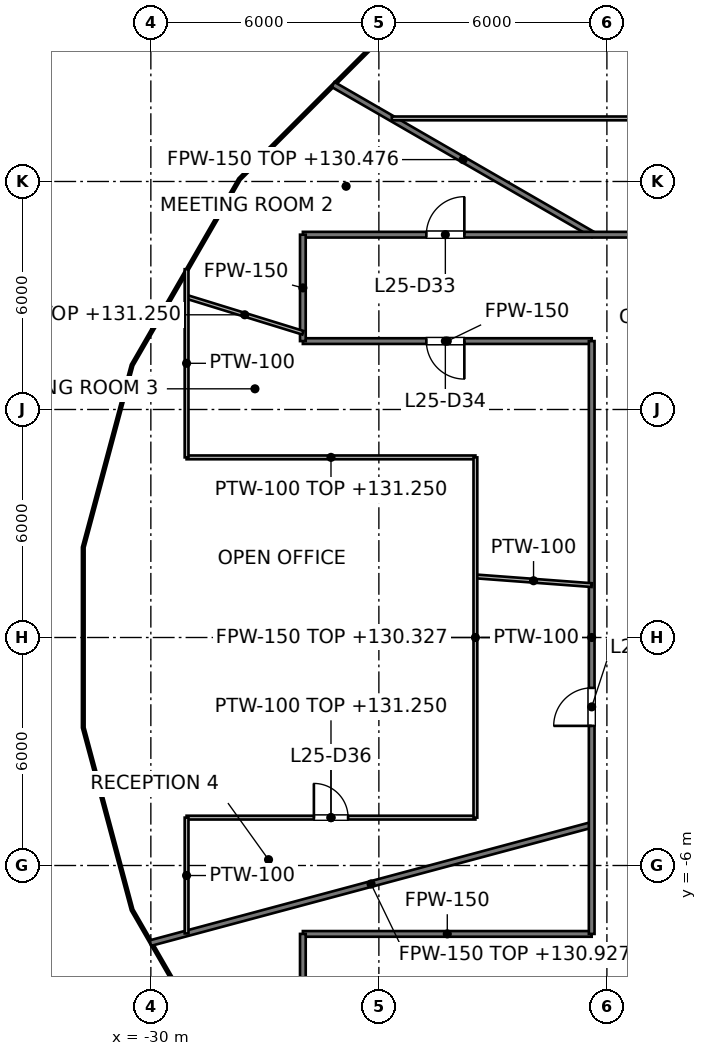
"""IFC4 building model, lengths in metres.
Left out: names, types, materials, properties, quantities, classifications, styles, units other than length and angle.
Written with IfcOpenShell. Run it as: python <this file> out.ifc"""

import sys

from ifc_helpers import new_model, si_unit, direction, frame, frame_2d, origin, place, context, subcontext, project, spatial, rectangle, extrude, element, fill, save


model = new_model("IFC4")
c1 = context("Model", 3, precision=1e-05, world=origin(), true_north=direction((0.0, 1.0)))
c2 = subcontext(c1, "Body", "Model", "MODEL_VIEW")
j1 = project(units=[si_unit("LENGTHUNIT", "METRE"), si_unit("PLANEANGLEUNIT", "RADIAN")], contexts=[c1])
p1 = place(None, origin())
s1 = spatial("IfcSite", under=j1, at=p1, CompositionType="ELEMENT")
p2 = place(p1, origin())
s2 = spatial("IfcBuilding", under=s1, at=p2, CompositionType="ELEMENT")
p3 = place(p2, frame((0.0, 0.0, 127.2)))
s3 = spatial("IfcBuildingStorey", under=s2, at=p3, CompositionType="ELEMENT", Elevation=127.2)
p4 = place(p3, frame((-25.205, 14.552, 0.0), z_axis=(0.0, 0.0, 1.0), x_axis=(0.866027670838, -0.499996073327, 0.0)))
e1 = element("IfcWall", 1, at=p4, inside=s3, PredefinedType="PARTITIONING", context=c2, shape_type="SweptSolid", body=[
    extrude(rectangle(XDim=7.904, YDim=0.15, at=frame_2d((3.952, 0.0))), origin(), (0.0, 0.0, 1.0), 3.276),
])
p5 = place(p3, frame((-26.0, -7.8, 0.0), z_axis=(0.0, 0.0, 1.0), x_axis=(1.0, 0.0, 0.0)))
e2 = element("IfcWall", 2, at=p5, inside=s3, PredefinedType="PARTITIONING", context=c2, shape_type="SweptSolid", body=[
    extrude(rectangle(XDim=7.6, YDim=0.15, at=frame_2d((3.8, 0.0))), origin(), (0.0, 0.0, 1.0), 3.195),
])
p6 = place(p3, frame((-26.0, 7.8, 0.0), z_axis=(0.0, 0.0, 1.0), x_axis=(1.0, 0.0, 0.0)))
e3 = element("IfcWall", 3, at=p6, inside=s3, PredefinedType="PARTITIONING", context=c2, shape_type="SweptSolid", body=[
    extrude(rectangle(XDim=7.6, YDim=0.15, at=frame_2d((3.8, 0.0))), origin(), (0.0, 0.0, 1.0), 3.195),
])
p7 = place(p6, frame((3.249, 0.0, 0.0)))
e4 = element("IfcOpeningElement", 4, at=p7, cuts=e3, PredefinedType="OPENING", context=c2, shape_type="SweptSolid", body=[
    extrude(rectangle(XDim=1.0, YDim=2.1, at=frame_2d((0.5, 1.05))), frame((0.0, 0.075, 0.0), z_axis=(0.0, -1.0, 0.0), x_axis=(1.0, 0.0, 0.0)), (0.0, 0.0, 1.0), 0.15),
])
p8 = place(p3, frame((-26.0, 10.6, 0.0), z_axis=(0.0, 0.0, 1.0), x_axis=(1.0, 0.0, 0.0)))
e5 = element("IfcWall", 5, at=p8, inside=s3, PredefinedType="PARTITIONING", context=c2, shape_type="SweptSolid", body=[
    extrude(rectangle(XDim=52.0, YDim=0.15, at=frame_2d((26.0, 0.0))), origin(), (0.0, 0.0, 1.0), 3.127),
])
p9 = place(p8, frame((41.861, 0.0, 0.0)))
e6 = element("IfcOpeningElement", 6, at=p9, cuts=e5, PredefinedType="OPENING", context=c2, shape_type="SweptSolid", body=[
    extrude(rectangle(XDim=1.2, YDim=2.1, at=frame_2d((0.6, 1.05))), frame((0.0, 0.075, 0.0), z_axis=(0.0, -1.0, 0.0), x_axis=(1.0, 0.0, 0.0)), (0.0, 0.0, 1.0), 0.15),
])
p10 = place(p8, frame((31.083, 0.0, 0.0)))
e7 = element("IfcOpeningElement", 7, at=p10, cuts=e5, PredefinedType="OPENING", context=c2, shape_type="SweptSolid", body=[
    extrude(rectangle(XDim=1.0, YDim=2.1, at=frame_2d((0.5, 1.05))), frame((0.0, 0.075, 0.0), z_axis=(0.0, -1.0, 0.0), x_axis=(1.0, 0.0, 0.0)), (0.0, 0.0, 1.0), 0.15),
])
p11 = place(p8, frame((29.233, 0.0, 0.0)))
e8 = element("IfcOpeningElement", 8, at=p11, cuts=e5, PredefinedType="OPENING", context=c2, shape_type="SweptSolid", body=[
    extrude(rectangle(XDim=1.0, YDim=2.1, at=frame_2d((0.5, 1.05))), frame((0.0, 0.075, 0.0), z_axis=(0.0, -1.0, 0.0), x_axis=(1.0, 0.0, 0.0)), (0.0, 0.0, 1.0), 0.15),
])
p12 = place(p8, frame((25.5, 0.0, 0.0)))
e9 = element("IfcOpeningElement", 9, at=p12, cuts=e5, PredefinedType="OPENING", context=c2, shape_type="SweptSolid", body=[
    extrude(rectangle(XDim=1.0, YDim=2.1, at=frame_2d((0.5, 1.05))), frame((0.0, 0.075, 0.0), z_axis=(0.0, -1.0, 0.0), x_axis=(1.0, 0.0, 0.0)), (0.0, 0.0, 1.0), 0.15),
])
p13 = place(p8, frame((14.83, 0.0, 0.0)))
e10 = element("IfcOpeningElement", 10, at=p13, cuts=e5, PredefinedType="OPENING", context=c2, shape_type="SweptSolid", body=[
    extrude(rectangle(XDim=1.0, YDim=2.1, at=frame_2d((0.5, 1.05))), frame((0.0, 0.075, 0.0), z_axis=(0.0, -1.0, 0.0), x_axis=(1.0, 0.0, 0.0)), (0.0, 0.0, 1.0), 0.15),
])
p14 = place(p8, frame((3.249, 0.0, 0.0)))
e11 = element("IfcOpeningElement", 11, at=p14, cuts=e5, PredefinedType="OPENING", context=c2, shape_type="SweptSolid", body=[
    extrude(rectangle(XDim=1.0, YDim=2.1, at=frame_2d((0.5, 1.05))), frame((0.0, 0.075, 0.0), z_axis=(0.0, -1.0, 0.0), x_axis=(1.0, 0.0, 0.0)), (0.0, 0.0, 1.0), 0.15),
])
p15 = place(p3, frame((-30.012, -8.042, 0.0), z_axis=(0.0, 0.0, 1.0), x_axis=(0.965928199485, 0.25881018805, 0.0)))
e12 = element("IfcWall", 12, at=p15, inside=s3, PredefinedType="PARTITIONING", context=c2, shape_type="SweptSolid", body=[
    extrude(rectangle(XDim=12.022, YDim=0.15, at=frame_2d((6.011, 0.0))), origin(), (0.0, 0.0, 1.0), 3.727),
])
p16 = place(p3, frame((-18.4, -7.8, 0.0), z_axis=(0.0, 0.0, 1.0), x_axis=(0.0, 1.0, 0.0)))
e13 = element("IfcWall", 13, at=p16, inside=s3, PredefinedType="PARTITIONING", context=c2, shape_type="SweptSolid", body=[
    extrude(rectangle(XDim=15.6, YDim=0.15, at=frame_2d((7.8, 0.0))), origin(), (0.0, 0.0, 1.0), 3.127),
])
p17 = place(p16, frame((5.474, 0.0, 0.0)))
e14 = element("IfcOpeningElement", 14, at=p17, cuts=e13, PredefinedType="OPENING", context=c2, shape_type="SweptSolid", body=[
    extrude(rectangle(XDim=1.0, YDim=2.1, at=frame_2d((0.5, 1.05))), frame((0.0, 0.075, 0.0), z_axis=(0.0, -1.0, 0.0), x_axis=(1.0, 0.0, 0.0)), (0.0, 0.0, 1.0), 0.15),
])
for number, where, z_axis, x_axis in (
    (15, (-26.0, -10.6, 0.0), (0.0, 0.0, 1.0), (0.0, 1.0, 0.0)),
    (16, (-26.0, 7.8, 0.0), (0.0, 0.0, 1.0), (0.0, 1.0, 0.0)),
):
    element("IfcWall", number, at=place(p3, frame(where, z_axis=z_axis, x_axis=x_axis)), inside=s3, PredefinedType="PARTITIONING", context=c2, shape_type="SweptSolid", body=[
        extrude(rectangle(XDim=2.8, YDim=0.15, at=frame_2d((1.4, 0.0))), origin(), (0.0, 0.0, 1.0), 3.195),
    ])
p18 = place(p3, frame((-29.06, 8.964, 0.0), z_axis=(0.0, 0.0, 1.0), x_axis=(0.955556205091, -0.294808987162, 0.0)))
e17 = element("IfcWall", 17, at=p18, inside=s3, PredefinedType="PARTITIONING", context=c2, shape_type="SweptSolid", body=[
    extrude(rectangle(XDim=3.202, YDim=0.1, at=frame_2d((1.601, 0.0))), origin(), (0.0, 0.0, 1.0), 4.05),
])
p19 = place(p3, frame((-21.46, 1.608, 0.0), z_axis=(0.0, 0.0, 1.0), x_axis=(0.997211460705, -0.074627760503, 0.0)))
e18 = element("IfcWall", 18, at=p19, inside=s3, PredefinedType="PARTITIONING", context=c2, shape_type="SweptSolid", body=[
    extrude(rectangle(XDim=3.069, YDim=0.1, at=frame_2d((1.534, 0.0))), origin(), (0.0, 0.0, 1.0), 3.127),
])
p20 = place(p3, frame((-29.06, -4.74, 0.0), z_axis=(0.0, 0.0, 1.0), x_axis=(1.0, 0.0, 0.0)))
e19 = element("IfcWall", 19, at=p20, inside=s3, PredefinedType="PARTITIONING", context=c2, shape_type="SweptSolid", body=[
    extrude(rectangle(XDim=7.6, YDim=0.1, at=frame_2d((3.8, 0.0))), origin(), (0.0, 0.0, 1.0), 4.05),
])
p21 = place(p20, frame((3.35, 0.0, 0.0)))
e20 = element("IfcOpeningElement", 20, at=p21, cuts=e19, PredefinedType="OPENING", context=c2, shape_type="SweptSolid", body=[
    extrude(rectangle(XDim=0.9, YDim=2.1, at=frame_2d((0.45, 1.05))), frame((0.0, 0.05, 0.0), z_axis=(0.0, -1.0, 0.0), x_axis=(1.0, 0.0, 0.0)), (0.0, 0.0, 1.0), 0.1),
])
p22 = place(p3, frame((-29.06, 4.74, 0.0), z_axis=(0.0, 0.0, 1.0), x_axis=(1.0, 0.0, 0.0)))
e21 = element("IfcWall", 21, at=p22, inside=s3, PredefinedType="PARTITIONING", context=c2, shape_type="SweptSolid", body=[
    extrude(rectangle(XDim=7.6, YDim=0.1, at=frame_2d((3.8, 0.0))), origin(), (0.0, 0.0, 1.0), 4.05),
])
p23 = place(p3, frame((-23.66, 13.66, 0.0), z_axis=(0.0, 0.0, 1.0), x_axis=(1.0, 0.0, 0.0)))
e22 = element("IfcWall", 22, at=p23, inside=s3, PredefinedType="PARTITIONING", context=c2, shape_type="SweptSolid", body=[
    extrude(rectangle(XDim=32.451, YDim=0.1, at=frame_2d((16.226, 0.0))), origin(), (0.0, 0.0, 1.0), 3.127),
])
p24 = place(p23, frame((9.55, 0.0, 0.0)))
e23 = element("IfcOpeningElement", 23, at=p24, cuts=e22, PredefinedType="OPENING", context=c2, shape_type="SweptSolid", body=[
    extrude(rectangle(XDim=0.9, YDim=2.1, at=frame_2d((0.45, 1.05))), frame((0.0, 0.05, 0.0), z_axis=(0.0, -1.0, 0.0), x_axis=(1.0, 0.0, 0.0)), (0.0, 0.0, 1.0), 0.1),
])
p25 = place(p3, frame((-21.46, -4.74, 0.0), z_axis=(0.0, 0.0, 1.0), x_axis=(0.0, 1.0, 0.0)))
e24 = element("IfcWall", 24, at=p25, inside=s3, PredefinedType="PARTITIONING", context=c2, shape_type="SweptSolid", body=[
    extrude(rectangle(XDim=9.48, YDim=0.1, at=frame_2d((4.74, 0.0))), origin(), (0.0, 0.0, 1.0), 3.127),
])
p26 = place(p3, frame((-29.06, -7.787, 0.0), z_axis=(0.0, 0.0, 1.0), x_axis=(0.0, 1.0, 0.0)))
e25 = element("IfcWall", 25, at=p26, inside=s3, PredefinedType="PARTITIONING", context=c2, shape_type="SweptSolid", body=[
    extrude(rectangle(XDim=3.047, YDim=0.1, at=frame_2d((1.523, 0.0))), origin(), (0.0, 0.0, 1.0), 3.127),
])
p27 = place(p3, frame((-29.06, 4.74, 0.0), z_axis=(0.0, 0.0, 1.0), x_axis=(0.0, 1.0, 0.0)))
e26 = element("IfcWall", 26, at=p27, inside=s3, PredefinedType="PARTITIONING", context=c2, shape_type="SweptSolid", body=[
    extrude(rectangle(XDim=4.951, YDim=0.1, at=frame_2d((2.476, 0.0))), origin(), (0.0, 0.0, 1.0), 3.127),
])
p28 = place(p14, origin())
e27 = element("IfcDoor", 27, at=p28, inside=s3, OperationType="SINGLE_SWING_RIGHT", PredefinedType="DOOR", context=c2, shape_type="SweptSolid", body=[
    extrude(rectangle(XDim=1.0, YDim=2.1, at=frame_2d((0.5, 1.05))), frame((0.0, 0.025, 0.0), z_axis=(0.0, -1.0, 0.0), x_axis=(1.0, 0.0, 0.0)), (0.0, 0.0, 1.0), 0.05),
])
fill(e11, e27)
p29 = place(p7, origin())
e28 = element("IfcDoor", 28, at=p29, inside=s3, OperationType="SINGLE_SWING_RIGHT", PredefinedType="DOOR", context=c2, shape_type="SweptSolid", body=[
    extrude(rectangle(XDim=1.0, YDim=2.1, at=frame_2d((0.5, 1.05))), frame((0.0, 0.025, 0.0), z_axis=(0.0, -1.0, 0.0), x_axis=(1.0, 0.0, 0.0)), (0.0, 0.0, 1.0), 0.05),
])
fill(e4, e28)
p30 = place(p17, origin())
e29 = element("IfcDoor", 29, at=p30, inside=s3, OperationType="SINGLE_SWING_LEFT", PredefinedType="DOOR", context=c2, shape_type="SweptSolid", body=[
    extrude(rectangle(XDim=1.0, YDim=2.1, at=frame_2d((0.5, 1.05))), frame((0.0, 0.025, 0.0), z_axis=(0.0, -1.0, 0.0), x_axis=(1.0, 0.0, 0.0)), (0.0, 0.0, 1.0), 0.05),
])
fill(e14, e29)
p31 = place(p21, origin())
e30 = element("IfcDoor", 30, at=p31, inside=s3, OperationType="SINGLE_SWING_LEFT", PredefinedType="DOOR", context=c2, shape_type="SweptSolid", body=[
    extrude(rectangle(XDim=0.9, YDim=2.1, at=frame_2d((0.45, 1.05))), frame((0.0, 0.025, 0.0), z_axis=(0.0, -1.0, 0.0), x_axis=(1.0, 0.0, 0.0)), (0.0, 0.0, 1.0), 0.05),
])
fill(e20, e30)
save(model, sys.argv[1])
